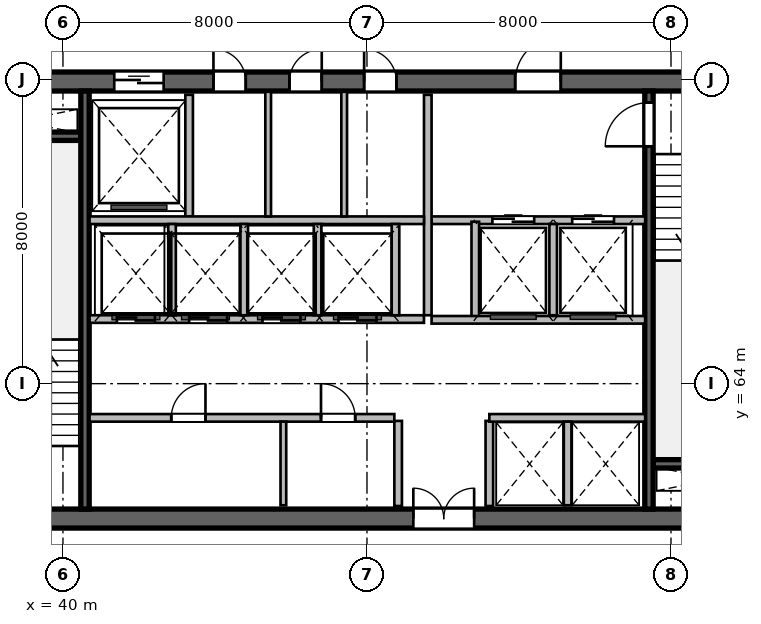
"""IFC4 building model, lengths in metres.
Left out: names, types, materials, properties, quantities, classifications, styles, units other than length and angle.
Written with IfcOpenShell. Run it as: python <this file> out.ifc"""

import sys

from ifc_helpers import new_model, si_unit, direction, frame, frame_2d, origin, place, context, subcontext, project, spatial, rectangle, extrude, source, transform, mapped, element, fill, save


model = new_model("IFC4")
c1 = context("Model", 3, precision=1e-05, world=origin(), true_north=direction((0.0, 1.0)))
c2 = subcontext(c1, "Body", "Model", "MODEL_VIEW")
j1 = project(units=[si_unit("LENGTHUNIT", "METRE"), si_unit("PLANEANGLEUNIT", "RADIAN")], contexts=[c1])
p1 = place(None, origin())
s1 = spatial("IfcSite", under=j1, at=p1, CompositionType="ELEMENT")
p2 = place(p1, origin())
s2 = spatial("IfcBuilding", under=s1, at=p2, CompositionType="ELEMENT")
p3 = place(p2, frame((0.0, 0.0, 177.9)))
s3 = spatial("IfcBuildingStorey", under=s2, at=p3, CompositionType="ELEMENT", Elevation=177.9)
m1 = source(origin(), c2, "Body", "SweptSolid", [
    extrude(rectangle(XDim=21.6, YDim=0.5, at=frame_2d((10.8, 0.0))), origin(), (0.0, 0.0, 1.0), 3.9),
])
p4 = place(p3, frame((37.2, 60.45, 0.0), z_axis=(0.0, 0.0, 1.0), x_axis=(1.0, 0.0, 0.0)))
e1 = element("IfcWall", 1, at=p4, inside=s3, PredefinedType="SHEAR", context=c2, shape_type="MappedRepresentation", body=[
    mapped(m1, transform((0.0, 0.0, 0.0), scale=1.0)),
])
p5 = place(p4, frame((1.1, 0.0, 0.0)))
e2 = element("IfcOpeningElement", 2, at=p5, cuts=e1, PredefinedType="OPENING", context=c2, shape_type="SweptSolid", body=[
    extrude(rectangle(XDim=1.15, YDim=2.15, at=frame_2d((0.575, 1.075))), frame((0.0, 0.26, 0.0), z_axis=(0.0, -1.0, 0.0), x_axis=(1.0, 0.0, 0.0)), (0.0, 0.0, 1.0), 0.52),
])
p6 = place(p4, frame((19.5, 0.0, 0.0)))
e3 = element("IfcOpeningElement", 3, at=p6, cuts=e1, PredefinedType="OPENING", context=c2, shape_type="SweptSolid", body=[
    extrude(rectangle(XDim=0.9, YDim=2.1, at=frame_2d((0.45, 1.05))), frame((0.0, 0.26, 0.0), z_axis=(0.0, -1.0, 0.0), x_axis=(1.0, 0.0, 0.0)), (0.0, 0.0, 1.0), 0.52),
])
p7 = place(p4, frame((12.02, 0.0, 0.0)))
e4 = element("IfcOpeningElement", 4, at=p7, cuts=e1, PredefinedType="OPENING", context=c2, shape_type="SweptSolid", body=[
    extrude(rectangle(XDim=1.6, YDim=2.15, at=frame_2d((0.8, 1.075))), frame((0.0, 0.26, 0.0), z_axis=(0.0, -1.0, 0.0), x_axis=(1.0, 0.0, 0.0)), (0.0, 0.0, 1.0), 0.52),
])
p8 = place(p3, frame((37.2, 71.95, 0.0), z_axis=(0.0, 0.0, 1.0), x_axis=(1.0, 0.0, 0.0)))
e5 = element("IfcWall", 5, at=p8, inside=s3, PredefinedType="SHEAR", context=c2, shape_type="MappedRepresentation", body=[
    mapped(m1, transform((0.0, 0.0, 0.0), scale=1.0)),
])
p9 = place(p8, frame((1.2, 0.0, 0.0)))
e6 = element("IfcOpeningElement", 6, at=p9, cuts=e5, PredefinedType="OPENING", context=c2, shape_type="SweptSolid", body=[
    extrude(rectangle(XDim=0.9, YDim=2.1, at=frame_2d((0.45, 1.05))), frame((0.0, 0.26, 0.0), z_axis=(0.0, -1.0, 0.0), x_axis=(1.0, 0.0, 0.0)), (0.0, 0.0, 1.0), 0.52),
])
p10 = place(p8, frame((14.7, 0.0, 0.0)))
e7 = element("IfcOpeningElement", 7, at=p10, cuts=e5, PredefinedType="OPENING", context=c2, shape_type="SweptSolid", body=[
    extrude(rectangle(XDim=1.2, YDim=2.15, at=frame_2d((0.6, 1.075))), frame((0.0, 0.26, 0.0), z_axis=(0.0, -1.0, 0.0), x_axis=(1.0, 0.0, 0.0)), (0.0, 0.0, 1.0), 0.52),
])
p11 = place(p8, frame((4.15, 0.0, 0.0)))
e8 = element("IfcOpeningElement", 8, at=p11, cuts=e5, PredefinedType="OPENING", context=c2, shape_type="SweptSolid", body=[
    extrude(rectangle(XDim=1.3, YDim=2.15, at=frame_2d((0.65, 1.075))), frame((0.0, 0.26, 0.0), z_axis=(0.0, -1.0, 0.0), x_axis=(1.0, 0.0, 0.0)), (0.0, 0.0, 1.0), 0.52),
])
p12 = place(p8, frame((6.76, 0.0, 0.0)))
e9 = element("IfcOpeningElement", 9, at=p12, cuts=e5, PredefinedType="OPENING", context=c2, shape_type="SweptSolid", body=[
    extrude(rectangle(XDim=0.85, YDim=2.1, at=frame_2d((0.425, 1.05))), frame((0.0, 0.26, 0.0), z_axis=(0.0, -1.0, 0.0), x_axis=(1.0, 0.0, 0.0)), (0.0, 0.0, 1.0), 0.52),
])
p13 = place(p8, frame((8.76, 0.0, 0.0)))
e10 = element("IfcOpeningElement", 10, at=p13, cuts=e5, PredefinedType="OPENING", context=c2, shape_type="SweptSolid", body=[
    extrude(rectangle(XDim=0.85, YDim=2.1, at=frame_2d((0.425, 1.05))), frame((0.0, 0.26, 0.0), z_axis=(0.0, -1.0, 0.0), x_axis=(1.0, 0.0, 0.0)), (0.0, 0.0, 1.0), 0.52),
])
p14 = place(p8, frame((10.725, 0.0, 0.0)))
e11 = element("IfcOpeningElement", 11, at=p14, cuts=e5, PredefinedType="OPENING", context=c2, shape_type="SweptSolid", body=[
    extrude(rectangle(XDim=0.85, YDim=2.1, at=frame_2d((0.425, 1.05))), frame((0.0, 0.26, 0.0), z_axis=(0.0, -1.0, 0.0), x_axis=(1.0, 0.0, 0.0)), (0.0, 0.0, 1.0), 0.52),
])
m2 = source(origin(), c2, "Body", "SweptSolid", [
    extrude(rectangle(XDim=3.27, YDim=0.22, at=frame_2d((1.635, 0.0))), origin(), (0.0, 0.0, 1.0), 3.9),
])
for number, where, z_axis, x_axis in (
    (12, (37.2, 70.51, 0.0), (0.0, 0.0, 1.0), (1.0, 0.0, 0.0)),
    (13, (55.53, 61.89, 0.0), (0.0, 0.0, 1.0), (1.0, 0.0, 0.0)),
):
    element("IfcWall", number, at=place(p3, frame(where, z_axis=z_axis, x_axis=x_axis)), inside=s3, PredefinedType="SHEAR", context=c2, shape_type="MappedRepresentation", body=[
        mapped(m2, transform((0.0, 0.0, 0.0), scale=1.0)),
    ])
m3 = source(origin(), c2, "Body", "SweptSolid", [
    extrude(rectangle(XDim=11.0, YDim=0.22, at=frame_2d((5.5, 0.0))), origin(), (0.0, 0.0, 1.0), 3.9),
])
p15 = place(p3, frame((40.58, 60.7, 0.0), z_axis=(0.0, 0.0, 1.0), x_axis=(0.0, 1.0, 0.0)))
e14 = element("IfcWall", 14, at=p15, inside=s3, PredefinedType="SHEAR", context=c2, shape_type="MappedRepresentation", body=[
    mapped(m3, transform((0.0, 0.0, 0.0), scale=1.0)),
])
p16 = place(p3, frame((55.42, 60.7, 0.0), z_axis=(0.0, 0.0, 1.0), x_axis=(0.0, 1.0, 0.0)))
e15 = element("IfcWall", 15, at=p16, inside=s3, PredefinedType="SHEAR", context=c2, shape_type="MappedRepresentation", body=[
    mapped(m3, transform((0.0, 0.0, 0.0), scale=1.0)),
])
p17 = place(p16, frame((9.545, 0.0, 0.0)))
e16 = element("IfcOpeningElement", 16, at=p17, cuts=e15, PredefinedType="OPENING", context=c2, shape_type="SweptSolid", body=[
    extrude(rectangle(XDim=1.15, YDim=2.15, at=frame_2d((0.575, 1.075))), frame((0.0, 0.12, 0.0), z_axis=(0.0, -1.0, 0.0), x_axis=(1.0, 0.0, 0.0)), (0.0, 0.0, 1.0), 0.24),
])
m4 = source(origin(), c2, "Body", "SweptSolid", [
    extrude(rectangle(XDim=2.24, YDim=0.2, at=frame_2d((1.12, 0.0))), origin(), (0.0, 0.0, 1.0), 3.65),
])
for number, where, z_axis, x_axis in (
    (17, (48.82, 60.78, 0.0), (0.0, 0.0, 1.0), (0.0, 1.0, 0.0)),
    (18, (51.22, 60.78, 0.0), (0.0, 0.0, 1.0), (0.0, 1.0, 0.0)),
):
    element("IfcWall", number, at=place(p3, frame(where, z_axis=z_axis, x_axis=x_axis)), inside=s3, PredefinedType="SOLIDWALL", context=c2, shape_type="MappedRepresentation", body=[
        mapped(m4, transform((0.0, 0.0, 0.0), scale=1.0)),
    ])
m5 = source(origin(), c2, "Body", "SweptSolid", [
    extrude(rectangle(XDim=5.62, YDim=0.2, at=frame_2d((2.81, 0.0))), origin(), (0.0, 0.0, 1.0), 3.65),
])
p18 = place(p3, frame((49.7, 68.3, 0.0), z_axis=(0.0, 0.0, 1.0), x_axis=(1.0, 0.0, 0.0)))
e19 = element("IfcWall", 19, at=p18, inside=s3, PredefinedType="SOLIDWALL", context=c2, shape_type="MappedRepresentation", body=[
    mapped(m5, transform((0.0, 0.0, 0.0), scale=1.0)),
])
p19 = place(p18, frame((1.6, 0.0, 0.0)))
e20 = element("IfcOpeningElement", 20, at=p19, cuts=e19, PredefinedType="OPENING", context=c2, shape_type="SweptSolid", body=[
    extrude(rectangle(XDim=1.1, YDim=2.15, at=frame_2d((0.55, 1.075))), frame((0.0, 0.11, 0.0), z_axis=(0.0, -1.0, 0.0), x_axis=(1.0, 0.0, 0.0)), (0.0, 0.0, 1.0), 0.22),
])
p20 = place(p18, frame((3.7, 0.0, 0.0)))
e21 = element("IfcOpeningElement", 21, at=p20, cuts=e19, PredefinedType="OPENING", context=c2, shape_type="SweptSolid", body=[
    extrude(rectangle(XDim=1.1, YDim=2.15, at=frame_2d((0.55, 1.075))), frame((0.0, 0.11, 0.0), z_axis=(0.0, -1.0, 0.0), x_axis=(1.0, 0.0, 0.0)), (0.0, 0.0, 1.0), 0.22),
])
m6 = source(origin(), c2, "Body", "SweptSolid", [
    extrude(rectangle(XDim=5.8, YDim=0.2, at=frame_2d((2.9, 0.0))), origin(), (0.0, 0.0, 1.0), 3.65),
])
p21 = place(p3, frame((49.6, 65.8, 0.0), z_axis=(0.0, 0.0, 1.0), x_axis=(0.0, 1.0, 0.0)))
e22 = element("IfcWall", 22, at=p21, inside=s3, PredefinedType="SOLIDWALL", context=c2, shape_type="MappedRepresentation", body=[
    mapped(m6, transform((0.0, 0.0, 0.0), scale=1.0)),
])
m7 = source(origin(), c2, "Body", "SweptSolid", [
    extrude(rectangle(XDim=2.58, YDim=0.2, at=frame_2d((1.29, 0.0))), origin(), (0.0, 0.0, 1.0), 3.65),
])
p22 = place(p3, frame((50.85, 65.68, 0.0), z_axis=(0.0, 0.0, 1.0), x_axis=(0.0, 1.0, 0.0)))
e23 = element("IfcWall", 23, at=p22, inside=s3, PredefinedType="SOLIDWALL", context=c2, shape_type="MappedRepresentation", body=[
    mapped(m7, transform((0.0, 0.0, 0.0), scale=1.0)),
])
m8 = source(origin(), c2, "Body", "SweptSolid", [
    extrude(rectangle(XDim=2.4, YDim=0.2, at=frame_2d((1.2, 0.0))), origin(), (0.0, 0.0, 1.0), 3.65),
])
p23 = place(p3, frame((52.9, 65.8, 0.0), z_axis=(0.0, 0.0, 1.0), x_axis=(0.0, 1.0, 0.0)))
e24 = element("IfcWall", 24, at=p23, inside=s3, PredefinedType="SOLIDWALL", context=c2, shape_type="MappedRepresentation", body=[
    mapped(m8, transform((0.0, 0.0, 0.0), scale=1.0)),
])
p24 = place(p3, frame((49.7, 65.68, 0.0), z_axis=(0.0, 0.0, 1.0), x_axis=(1.0, 0.0, 0.0)))
e25 = element("IfcWall", 25, at=p24, inside=s3, PredefinedType="SOLIDWALL", context=c2, shape_type="MappedRepresentation", body=[
    mapped(m5, transform((0.0, 0.0, 0.0), scale=1.0)),
])
m9 = source(origin(), c2, "Body", "SweptSolid", [
    extrude(rectangle(XDim=3.2, YDim=0.2, at=frame_2d((1.6, 0.0))), origin(), (0.0, 0.0, 1.0), 3.65),
])
p25 = place(p3, frame((43.32, 68.4, 0.0), z_axis=(0.0, 0.0, 1.0), x_axis=(0.0, 1.0, 0.0)))
e26 = element("IfcWall", 26, at=p25, inside=s3, PredefinedType="SOLIDWALL", context=c2, shape_type="MappedRepresentation", body=[
    mapped(m9, transform((0.0, 0.0, 0.0), scale=1.0)),
])
m10 = source(origin(), c2, "Body", "SweptSolid", [
    extrude(rectangle(XDim=8.8, YDim=0.2, at=frame_2d((4.4, 0.0))), origin(), (0.0, 0.0, 1.0), 3.65),
])
p26 = place(p3, frame((40.7, 68.3, 0.0), z_axis=(0.0, 0.0, 1.0), x_axis=(1.0, 0.0, 0.0)))
e27 = element("IfcWall", 27, at=p26, inside=s3, PredefinedType="SOLIDWALL", context=c2, shape_type="MappedRepresentation", body=[
    mapped(m10, transform((0.0, 0.0, 0.0), scale=1.0)),
])
m11 = source(origin(), c2, "Body", "SweptSolid", [
    extrude(rectangle(XDim=3.28, YDim=0.15, at=frame_2d((1.64, 0.0))), origin(), (0.0, 0.0, 1.0), 3.65),
])
for number, where, z_axis, x_axis in (
    (28, (45.4, 68.4, 0.0), (0.0, 0.0, 1.0), (0.0, 1.0, 0.0)),
    (29, (47.4, 68.4, 0.0), (0.0, 0.0, 1.0), (0.0, 1.0, 0.0)),
):
    element("IfcWall", number, at=place(p3, frame(where, z_axis=z_axis, x_axis=x_axis)), inside=s3, PredefinedType="PARTITIONING", context=c2, shape_type="MappedRepresentation", body=[
        mapped(m11, transform((0.0, 0.0, 0.0), scale=1.0)),
    ])
m12 = source(origin(), c2, "Body", "SweptSolid", [
    extrude(rectangle(XDim=8.02, YDim=0.2, at=frame_2d((4.01, 0.0))), origin(), (0.0, 0.0, 1.0), 3.65),
])
p27 = place(p3, frame((40.7, 63.1, 0.0), z_axis=(0.0, 0.0, 1.0), x_axis=(1.0, 0.0, 0.0)))
e30 = element("IfcWall", 30, at=p27, inside=s3, PredefinedType="SOLIDWALL", context=c2, shape_type="MappedRepresentation", body=[
    mapped(m12, transform((0.0, 0.0, 0.0), scale=1.0)),
])
p28 = place(p27, frame((2.15, 0.0, 0.0)))
e31 = element("IfcOpeningElement", 31, at=p28, cuts=e30, PredefinedType="OPENING", context=c2, shape_type="SweptSolid", body=[
    extrude(rectangle(XDim=0.9, YDim=2.1, at=frame_2d((0.45, 1.05))), frame((0.0, 0.11, 0.0), z_axis=(0.0, -1.0, 0.0), x_axis=(1.0, 0.0, 0.0)), (0.0, 0.0, 1.0), 0.22),
])
p29 = place(p27, frame((6.09, 0.0, 0.0)))
e32 = element("IfcOpeningElement", 32, at=p29, cuts=e30, PredefinedType="OPENING", context=c2, shape_type="SweptSolid", body=[
    extrude(rectangle(XDim=0.9, YDim=2.1, at=frame_2d((0.45, 1.05))), frame((0.0, 0.11, 0.0), z_axis=(0.0, -1.0, 0.0), x_axis=(1.0, 0.0, 0.0)), (0.0, 0.0, 1.0), 0.22),
])
m13 = source(origin(), c2, "Body", "SweptSolid", [
    extrude(rectangle(XDim=4.1, YDim=0.2, at=frame_2d((2.05, 0.0))), origin(), (0.0, 0.0, 1.0), 3.65),
])
p30 = place(p3, frame((51.22, 63.1, 0.0), z_axis=(0.0, 0.0, 1.0), x_axis=(1.0, 0.0, 0.0)))
e33 = element("IfcWall", 33, at=p30, inside=s3, PredefinedType="SOLIDWALL", context=c2, shape_type="MappedRepresentation", body=[
    mapped(m13, transform((0.0, 0.0, 0.0), scale=1.0)),
])
m14 = source(origin(), c2, "Body", "SweptSolid", [
    extrude(rectangle(XDim=2.2, YDim=0.15, at=frame_2d((1.1, 0.0))), origin(), (0.0, 0.0, 1.0), 3.65),
])
p31 = place(p3, frame((45.8, 60.8, 0.0), z_axis=(0.0, 0.0, 1.0), x_axis=(0.0, 1.0, 0.0)))
e34 = element("IfcWall", 34, at=p31, inside=s3, PredefinedType="PARTITIONING", context=c2, shape_type="MappedRepresentation", body=[
    mapped(m14, transform((0.0, 0.0, 0.0), scale=1.0)),
])
m15 = source(origin(), c2, "Body", "SweptSolid", [
    extrude(rectangle(XDim=2.2, YDim=0.2, at=frame_2d((1.1, 0.0))), origin(), (0.0, 0.0, 1.0), 3.65),
])
p32 = place(p3, frame((53.28, 60.8, 0.0), z_axis=(0.0, 0.0, 1.0), x_axis=(0.0, 1.0, 0.0)))
e35 = element("IfcWall", 35, at=p32, inside=s3, PredefinedType="SOLIDWALL", context=c2, shape_type="MappedRepresentation", body=[
    mapped(m15, transform((0.0, 0.0, 0.0), scale=1.0)),
])
p33 = place(p3, frame((40.7, 65.7, 0.0), z_axis=(0.0, 0.0, 1.0), x_axis=(1.0, 0.0, 0.0)))
e36 = element("IfcWall", 36, at=p33, inside=s3, PredefinedType="SOLIDWALL", context=c2, shape_type="MappedRepresentation", body=[
    mapped(m10, transform((0.0, 0.0, 0.0), scale=1.0)),
])
p34 = place(p33, frame((0.72, 0.0, 0.0)))
e37 = element("IfcOpeningElement", 37, at=p34, cuts=e36, PredefinedType="OPENING", context=c2, shape_type="SweptSolid", body=[
    extrude(rectangle(XDim=1.0, YDim=2.15, at=frame_2d((0.5, 1.075))), frame((0.0, 0.11, 0.0), z_axis=(0.0, -1.0, 0.0), x_axis=(1.0, 0.0, 0.0)), (0.0, 0.0, 1.0), 0.22),
])
p35 = place(p33, frame((2.62, 0.0, 0.0)))
e38 = element("IfcOpeningElement", 38, at=p35, cuts=e36, PredefinedType="OPENING", context=c2, shape_type="SweptSolid", body=[
    extrude(rectangle(XDim=1.0, YDim=2.15, at=frame_2d((0.5, 1.075))), frame((0.0, 0.11, 0.0), z_axis=(0.0, -1.0, 0.0), x_axis=(1.0, 0.0, 0.0)), (0.0, 0.0, 1.0), 0.22),
])
p36 = place(p33, frame((4.55, 0.0, 0.0)))
e39 = element("IfcOpeningElement", 39, at=p36, cuts=e36, PredefinedType="OPENING", context=c2, shape_type="SweptSolid", body=[
    extrude(rectangle(XDim=1.0, YDim=2.15, at=frame_2d((0.5, 1.075))), frame((0.0, 0.11, 0.0), z_axis=(0.0, -1.0, 0.0), x_axis=(1.0, 0.0, 0.0)), (0.0, 0.0, 1.0), 0.22),
])
p37 = place(p33, frame((6.55, 0.0, 0.0)))
e40 = element("IfcOpeningElement", 40, at=p37, cuts=e36, PredefinedType="OPENING", context=c2, shape_type="SweptSolid", body=[
    extrude(rectangle(XDim=1.0, YDim=2.15, at=frame_2d((0.5, 1.075))), frame((0.0, 0.11, 0.0), z_axis=(0.0, -1.0, 0.0), x_axis=(1.0, 0.0, 0.0)), (0.0, 0.0, 1.0), 0.22),
])
for number, where, z_axis, x_axis in (
    (41, (48.75, 65.8, 0.0), (0.0, 0.0, 1.0), (0.0, 1.0, 0.0)),
    (42, (42.87, 65.8, 0.0), (0.0, 0.0, 1.0), (0.0, 1.0, 0.0)),
    (43, (44.77, 65.8, 0.0), (0.0, 0.0, 1.0), (0.0, 1.0, 0.0)),
    (44, (46.7, 65.8, 0.0), (0.0, 0.0, 1.0), (0.0, 1.0, 0.0)),
):
    element("IfcWall", number, at=place(p3, frame(where, z_axis=z_axis, x_axis=x_axis)), inside=s3, PredefinedType="SOLIDWALL", context=c2, shape_type="MappedRepresentation", body=[
        mapped(m8, transform((0.0, 0.0, 0.0), scale=1.0)),
    ])
m16 = source(origin(), c2, "Body", "SweptSolid", [
    extrude(rectangle(XDim=1.15, YDim=2.15, at=frame_2d((0.575, 1.075))), frame((0.0, 0.025, 0.0), z_axis=(0.0, -1.0, 0.0), x_axis=(1.0, 0.0, 0.0)), (0.0, 0.0, 1.0), 0.05),
])
p38 = place(p17, origin())
e45 = element("IfcDoor", 45, at=p38, inside=s3, OperationType="SINGLE_SWING_LEFT", PredefinedType="DOOR", context=c2, shape_type="MappedRepresentation", body=[
    mapped(m16, transform((0.0, 0.0, 0.0), scale=1.0)),
])
fill(e16, e45)
m17 = source(origin(), c2, "Body", "SweptSolid", [
    extrude(rectangle(XDim=1.6, YDim=2.15, at=frame_2d((0.8, 1.075))), frame((0.0, 0.025, 0.0), z_axis=(0.0, -1.0, 0.0), x_axis=(1.0, 0.0, 0.0)), (0.0, 0.0, 1.0), 0.05),
])
p39 = place(p7, origin())
e46 = element("IfcDoor", 46, at=p39, inside=s3, OperationType="DOUBLE_DOOR_SINGLE_SWING", PredefinedType="DOOR", context=c2, shape_type="MappedRepresentation", body=[
    mapped(m17, transform((0.0, 0.0, 0.0), scale=1.0)),
])
fill(e4, e46)
m18 = source(origin(), c2, "Body", "SweptSolid", [
    extrude(rectangle(XDim=1.2, YDim=2.15, at=frame_2d((0.6, 1.075))), frame((0.0, 0.025, 0.0), z_axis=(0.0, -1.0, 0.0), x_axis=(1.0, 0.0, 0.0)), (0.0, 0.0, 1.0), 0.05),
])
p40 = place(p10, origin())
e47 = element("IfcDoor", 47, at=p40, inside=s3, OperationType="SINGLE_SWING_RIGHT", PredefinedType="DOOR", context=c2, shape_type="MappedRepresentation", body=[
    mapped(m18, transform((0.0, 0.0, 0.0), scale=1.0)),
])
fill(e7, e47)
m19 = source(origin(), c2, "Body", "SweptSolid", [
    extrude(rectangle(XDim=1.1, YDim=2.15, at=frame_2d((0.55, 1.075))), frame((0.0, 0.025, 0.0), z_axis=(0.0, -1.0, 0.0), x_axis=(1.0, 0.0, 0.0)), (0.0, 0.0, 1.0), 0.05),
])
p41 = place(p19, origin())
e48 = element("IfcDoor", 48, at=p41, inside=s3, OperationType="DOUBLE_DOOR_SLIDING", PredefinedType="DOOR", context=c2, shape_type="MappedRepresentation", body=[
    mapped(m19, transform((0.0, 0.0, 0.0), scale=1.0)),
])
fill(e20, e48)
p42 = place(p20, origin())
e49 = element("IfcDoor", 49, at=p42, inside=s3, OperationType="DOUBLE_DOOR_SLIDING", PredefinedType="DOOR", context=c2, shape_type="MappedRepresentation", body=[
    mapped(m19, transform((0.0, 0.0, 0.0), scale=1.0)),
])
fill(e21, e49)
m20 = source(origin(), c2, "Body", "SweptSolid", [
    extrude(rectangle(XDim=1.3, YDim=2.15, at=frame_2d((0.65, 1.075))), frame((0.0, 0.025, 0.0), z_axis=(0.0, -1.0, 0.0), x_axis=(1.0, 0.0, 0.0)), (0.0, 0.0, 1.0), 0.05),
])
p43 = place(p11, origin())
e50 = element("IfcDoor", 50, at=p43, inside=s3, OperationType="DOUBLE_DOOR_SLIDING", PredefinedType="DOOR", context=c2, shape_type="MappedRepresentation", body=[
    mapped(m20, transform((0.0, 0.0, 0.0), scale=1.0)),
])
fill(e8, e50)
m21 = source(origin(), c2, "Body", "SweptSolid", [
    extrude(rectangle(XDim=0.85, YDim=2.1, at=frame_2d((0.425, 1.05))), frame((0.0, 0.025, 0.0), z_axis=(0.0, -1.0, 0.0), x_axis=(1.0, 0.0, 0.0)), (0.0, 0.0, 1.0), 0.05),
])
p44 = place(p12, origin())
e51 = element("IfcDoor", 51, at=p44, inside=s3, OperationType="SINGLE_SWING_LEFT", PredefinedType="DOOR", context=c2, shape_type="MappedRepresentation", body=[
    mapped(m21, transform((0.0, 0.0, 0.0), scale=1.0)),
])
fill(e9, e51)
p45 = place(p13, origin())
e52 = element("IfcDoor", 52, at=p45, inside=s3, OperationType="SINGLE_SWING_RIGHT", PredefinedType="DOOR", context=c2, shape_type="MappedRepresentation", body=[
    mapped(m21, transform((0.0, 0.0, 0.0), scale=1.0)),
])
fill(e10, e52)
p46 = place(p14, origin())
e53 = element("IfcDoor", 53, at=p46, inside=s3, OperationType="SINGLE_SWING_LEFT", PredefinedType="DOOR", context=c2, shape_type="MappedRepresentation", body=[
    mapped(m21, transform((0.0, 0.0, 0.0), scale=1.0)),
])
fill(e11, e53)
m22 = source(origin(), c2, "Body", "SweptSolid", [
    extrude(rectangle(XDim=0.9, YDim=2.1, at=frame_2d((0.45, 1.05))), frame((0.0, 0.025, 0.0), z_axis=(0.0, -1.0, 0.0), x_axis=(1.0, 0.0, 0.0)), (0.0, 0.0, 1.0), 0.05),
])
p47 = place(p28, origin())
e54 = element("IfcDoor", 54, at=p47, inside=s3, OperationType="SINGLE_SWING_RIGHT", PredefinedType="DOOR", context=c2, shape_type="MappedRepresentation", body=[
    mapped(m22, transform((0.0, 0.0, 0.0), scale=1.0)),
])
fill(e31, e54)
p48 = place(p29, origin())
e55 = element("IfcDoor", 55, at=p48, inside=s3, OperationType="SINGLE_SWING_LEFT", PredefinedType="DOOR", context=c2, shape_type="MappedRepresentation", body=[
    mapped(m22, transform((0.0, 0.0, 0.0), scale=1.0)),
])
fill(e32, e55)
m23 = source(origin(), c2, "Body", "SweptSolid", [
    extrude(rectangle(XDim=1.0, YDim=2.15, at=frame_2d((0.5, 1.075))), frame((0.0, 0.025, 0.0), z_axis=(0.0, -1.0, 0.0), x_axis=(1.0, 0.0, 0.0)), (0.0, 0.0, 1.0), 0.05),
])
p49 = place(p34, origin())
e56 = element("IfcDoor", 56, at=p49, inside=s3, OperationType="DOUBLE_DOOR_SLIDING", PredefinedType="DOOR", context=c2, shape_type="MappedRepresentation", body=[
    mapped(m23, transform((0.0, 0.0, 0.0), scale=1.0)),
])
fill(e37, e56)
p50 = place(p35, origin())
e57 = element("IfcDoor", 57, at=p50, inside=s3, OperationType="DOUBLE_DOOR_SLIDING", PredefinedType="DOOR", context=c2, shape_type="MappedRepresentation", body=[
    mapped(m23, transform((0.0, 0.0, 0.0), scale=1.0)),
])
fill(e38, e57)
p51 = place(p36, origin())
e58 = element("IfcDoor", 58, at=p51, inside=s3, OperationType="DOUBLE_DOOR_SLIDING", PredefinedType="DOOR", context=c2, shape_type="MappedRepresentation", body=[
    mapped(m23, transform((0.0, 0.0, 0.0), scale=1.0)),
])
fill(e39, e58)
p52 = place(p37, origin())
e59 = element("IfcDoor", 59, at=p52, inside=s3, OperationType="DOUBLE_DOOR_SLIDING", PredefinedType="DOOR", context=c2, shape_type="MappedRepresentation", body=[
    mapped(m23, transform((0.0, 0.0, 0.0), scale=1.0)),
])
fill(e40, e59)
save(model, sys.argv[1])
